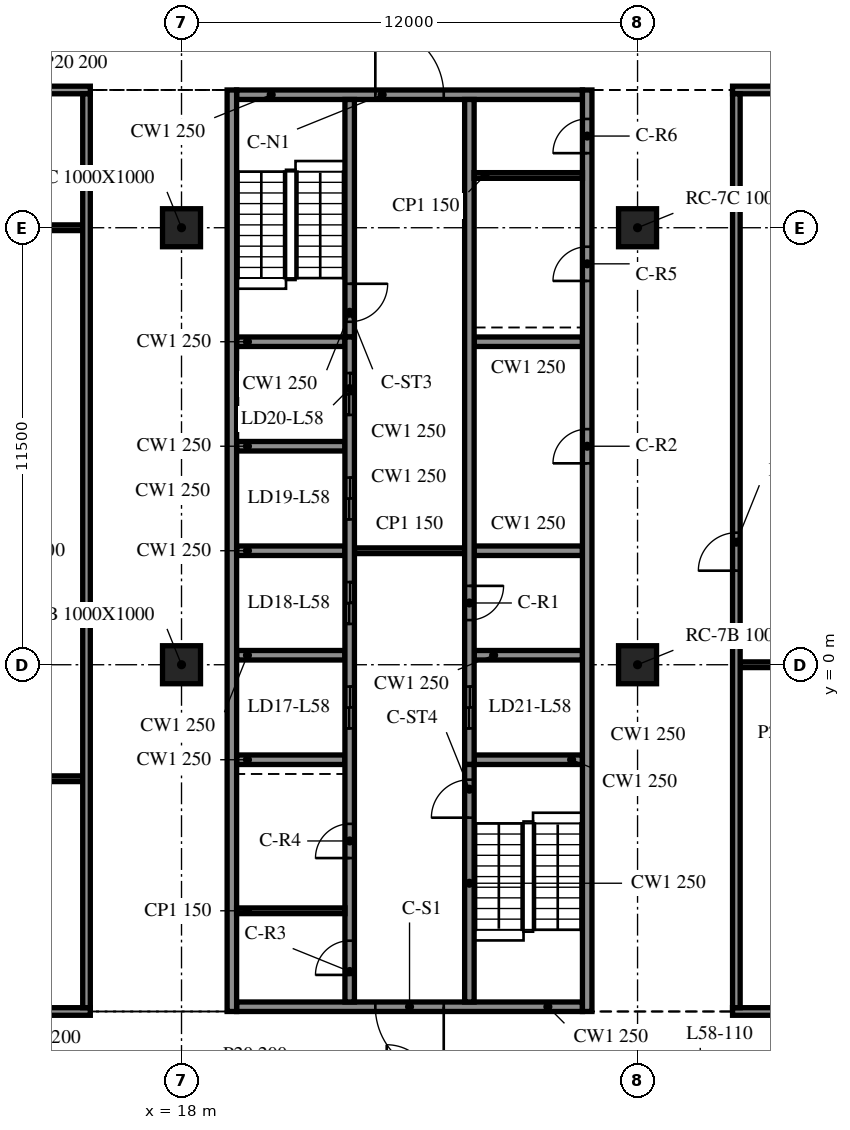
"""IFC4 building model, lengths in metres.
Left out: names, types, materials, properties, quantities, classifications, styles, units other than length and angle.
Written with IfcOpenShell. Run it as: python <this file> out.ifc"""

import sys

from ifc_helpers import new_model, si_unit, direction, frame, frame_2d, origin, origin_2d, place, context, subcontext, project, spatial, rectangle, extrude, element, fill, save


model = new_model("IFC4")
c1 = context("Model", 3, precision=1e-05, world=origin(), true_north=direction((0.0, 1.0)))
c2 = subcontext(c1, "Body", "Model", "MODEL_VIEW")
j1 = project(units=[si_unit("LENGTHUNIT", "METRE"), si_unit("PLANEANGLEUNIT", "RADIAN")], contexts=[c1])
p1 = place(None, origin())
s1 = spatial("IfcSite", under=j1, at=p1, CompositionType="ELEMENT")
p2 = place(p1, origin())
s2 = spatial("IfcBuilding", under=s1, at=p2, CompositionType="ELEMENT")
p3 = place(p2, frame((0.0, 0.0, 240.0)))
s3 = spatial("IfcBuildingStorey", under=s2, at=p3, CompositionType="ELEMENT", Elevation=240.0)
for number, where, z_axis, x_axis in (
    (1, (18.0, 0.0, -0.34), (0.0, 0.0, 1.0), (1.0, 0.0, 0.0)),
    (2, (18.0, 11.5, -0.34), (0.0, 0.0, 1.0), (1.0, 0.0, 0.0)),
    (3, (30.0, 0.0, -0.34), (0.0, 0.0, 1.0), (1.0, 0.0, 0.0)),
    (4, (30.0, 11.5, -0.34), (0.0, 0.0, 1.0), (1.0, 0.0, 0.0)),
):
    element("IfcColumn", number, at=place(p3, frame(where, z_axis=z_axis, x_axis=x_axis)), inside=s3, PredefinedType="COLUMN", context=c2, shape_type="SweptSolid", body=[
        extrude(rectangle(XDim=1.0, YDim=1.0, at=origin_2d()), origin(), (0.0, 0.0, 1.0), 3.8),
    ])
p4 = place(p3, frame((19.325, 15.125, 0.0), z_axis=(0.0, 0.0, 1.0), x_axis=(0.0, -1.0, 0.0)))
e5 = element("IfcWall", 5, at=p4, inside=s3, PredefinedType="SOLIDWALL", context=c2, shape_type="SweptSolid", body=[
    extrude(rectangle(XDim=24.25, YDim=0.25, at=frame_2d((12.125, 0.0))), origin(), (0.0, 0.0, 1.0), 3.46),
])
p5 = place(p3, frame((28.675, -9.125, 0.0), z_axis=(0.0, 0.0, 1.0), x_axis=(0.0, 1.0, 0.0)))
e6 = element("IfcWall", 6, at=p5, inside=s3, PredefinedType="SOLIDWALL", context=c2, shape_type="SweptSolid", body=[
    extrude(rectangle(XDim=24.25, YDim=0.25, at=frame_2d((12.125, 0.0))), origin(), (0.0, 0.0, 1.0), 3.46),
])
p6 = place(p5, frame((14.425, 0.0, 0.0)))
e7 = element("IfcOpeningElement", 7, at=p6, cuts=e6, PredefinedType="OPENING", context=c2, shape_type="SweptSolid", body=[
    extrude(rectangle(XDim=0.9, YDim=2.1, at=frame_2d((0.45, 1.05))), frame((0.0, 0.135, 0.0), z_axis=(0.0, -1.0, 0.0), x_axis=(1.0, 0.0, 0.0)), (0.0, 0.0, 1.0), 0.27),
])
p7 = place(p5, frame((19.225, 0.0, 0.0)))
e8 = element("IfcOpeningElement", 8, at=p7, cuts=e6, PredefinedType="OPENING", context=c2, shape_type="SweptSolid", body=[
    extrude(rectangle(XDim=0.9, YDim=2.1, at=frame_2d((0.45, 1.05))), frame((0.0, 0.135, 0.0), z_axis=(0.0, -1.0, 0.0), x_axis=(1.0, 0.0, 0.0)), (0.0, 0.0, 1.0), 0.27),
])
p8 = place(p5, frame((22.587, 0.0, 0.0)))
e9 = element("IfcOpeningElement", 9, at=p8, cuts=e6, PredefinedType="OPENING", context=c2, shape_type="SweptSolid", body=[
    extrude(rectangle(XDim=0.9, YDim=2.1, at=frame_2d((0.45, 1.05))), frame((0.0, 0.135, 0.0), z_axis=(0.0, -1.0, 0.0), x_axis=(1.0, 0.0, 0.0)), (0.0, 0.0, 1.0), 0.27),
])
p9 = place(p3, frame((28.55, -9.0, 0.0), z_axis=(0.0, 0.0, 1.0), x_axis=(-1.0, 0.0, 0.0)))
e10 = element("IfcWall", 10, at=p9, inside=s3, PredefinedType="SOLIDWALL", context=c2, shape_type="SweptSolid", body=[
    extrude(rectangle(XDim=9.1, YDim=0.25, at=frame_2d((4.55, 0.0))), origin(), (0.0, 0.0, 1.0), 3.46),
])
p10 = place(p9, frame((3.65, 0.0, 0.0)))
e11 = element("IfcOpeningElement", 11, at=p10, cuts=e10, PredefinedType="OPENING", context=c2, shape_type="SweptSolid", body=[
    extrude(rectangle(XDim=1.8, YDim=2.1, at=frame_2d((0.9, 1.05))), frame((0.0, 0.135, 0.0), z_axis=(0.0, -1.0, 0.0), x_axis=(1.0, 0.0, 0.0)), (0.0, 0.0, 1.0), 0.27),
])
p11 = place(p3, frame((19.45, 15.0, 0.0), z_axis=(0.0, 0.0, 1.0), x_axis=(1.0, 0.0, 0.0)))
e12 = element("IfcWall", 12, at=p11, inside=s3, PredefinedType="SOLIDWALL", context=c2, shape_type="SweptSolid", body=[
    extrude(rectangle(XDim=9.1, YDim=0.25, at=frame_2d((4.55, 0.0))), origin(), (0.0, 0.0, 1.0), 3.46),
])
p12 = place(p11, frame((3.65, 0.0, 0.0)))
e13 = element("IfcOpeningElement", 13, at=p12, cuts=e12, PredefinedType="OPENING", context=c2, shape_type="SweptSolid", body=[
    extrude(rectangle(XDim=1.8, YDim=2.1, at=frame_2d((0.9, 1.05))), frame((0.0, 0.135, 0.0), z_axis=(0.0, -1.0, 0.0), x_axis=(1.0, 0.0, 0.0)), (0.0, 0.0, 1.0), 0.27),
])
p13 = place(p3, frame((22.425, -8.875, 0.0), z_axis=(0.0, 0.0, 1.0), x_axis=(0.0, 1.0, 0.0)))
e14 = element("IfcWall", 14, at=p13, inside=s3, PredefinedType="SOLIDWALL", context=c2, shape_type="SweptSolid", body=[
    extrude(rectangle(XDim=17.5, YDim=0.25, at=frame_2d((8.75, 0.0))), origin(), (0.0, 0.0, 1.0), 3.46),
])
p14 = place(p13, frame((7.2, 0.0, 0.0)))
e15 = element("IfcOpeningElement", 15, at=p14, cuts=e14, PredefinedType="OPENING", context=c2, shape_type="SweptSolid", body=[
    extrude(rectangle(XDim=1.1, YDim=2.1, at=frame_2d((0.55, 1.05))), frame((0.0, 0.135, 0.0), z_axis=(0.0, -1.0, 0.0), x_axis=(1.0, 0.0, 0.0)), (0.0, 0.0, 1.0), 0.27),
])
p15 = place(p13, frame((9.95, 0.0, 0.0)))
e16 = element("IfcOpeningElement", 16, at=p15, cuts=e14, PredefinedType="OPENING", context=c2, shape_type="SweptSolid", body=[
    extrude(rectangle(XDim=1.1, YDim=2.1, at=frame_2d((0.55, 1.05))), frame((0.0, 0.135, 0.0), z_axis=(0.0, -1.0, 0.0), x_axis=(1.0, 0.0, 0.0)), (0.0, 0.0, 1.0), 0.27),
])
p16 = place(p13, frame((12.7, 0.0, 0.0)))
e17 = element("IfcOpeningElement", 17, at=p16, cuts=e14, PredefinedType="OPENING", context=c2, shape_type="SweptSolid", body=[
    extrude(rectangle(XDim=1.1, YDim=2.1, at=frame_2d((0.55, 1.05))), frame((0.0, 0.135, 0.0), z_axis=(0.0, -1.0, 0.0), x_axis=(1.0, 0.0, 0.0)), (0.0, 0.0, 1.0), 0.27),
])
p17 = place(p13, frame((15.45, 0.0, 0.0)))
e18 = element("IfcOpeningElement", 18, at=p17, cuts=e14, PredefinedType="OPENING", context=c2, shape_type="SweptSolid", body=[
    extrude(rectangle(XDim=1.1, YDim=2.1, at=frame_2d((0.55, 1.05))), frame((0.0, 0.135, 0.0), z_axis=(0.0, -1.0, 0.0), x_axis=(1.0, 0.0, 0.0)), (0.0, 0.0, 1.0), 0.27),
])
p18 = place(p13, frame((0.712, 0.0, 0.0)))
e19 = element("IfcOpeningElement", 19, at=p18, cuts=e14, PredefinedType="OPENING", context=c2, shape_type="SweptSolid", body=[
    extrude(rectangle(XDim=0.9, YDim=2.1, at=frame_2d((0.45, 1.05))), frame((0.0, 0.135, 0.0), z_axis=(0.0, -1.0, 0.0), x_axis=(1.0, 0.0, 0.0)), (0.0, 0.0, 1.0), 0.27),
])
p19 = place(p13, frame((3.788, 0.0, 0.0)))
e20 = element("IfcOpeningElement", 20, at=p19, cuts=e14, PredefinedType="OPENING", context=c2, shape_type="SweptSolid", body=[
    extrude(rectangle(XDim=0.9, YDim=2.1, at=frame_2d((0.45, 1.05))), frame((0.0, 0.135, 0.0), z_axis=(0.0, -1.0, 0.0), x_axis=(1.0, 0.0, 0.0)), (0.0, 0.0, 1.0), 0.27),
])
p20 = place(p3, frame((22.425, 14.875, 0.0), z_axis=(0.0, 0.0, 1.0), x_axis=(0.0, -1.0, 0.0)))
e21 = element("IfcWall", 21, at=p20, inside=s3, PredefinedType="SOLIDWALL", context=c2, shape_type="SweptSolid", body=[
    extrude(rectangle(XDim=6.25, YDim=0.25, at=frame_2d((3.125, 0.0))), origin(), (0.0, 0.0, 1.0), 3.46),
])
p21 = place(p20, frame((4.85, 0.0, 0.0)))
e22 = element("IfcOpeningElement", 22, at=p21, cuts=e21, PredefinedType="OPENING", context=c2, shape_type="SweptSolid", body=[
    extrude(rectangle(XDim=1.0, YDim=2.1, at=frame_2d((0.5, 1.05))), frame((0.0, 0.135, 0.0), z_axis=(0.0, -1.0, 0.0), x_axis=(1.0, 0.0, 0.0)), (0.0, 0.0, 1.0), 0.27),
])
p22 = place(p3, frame((25.575, -8.875, 0.0), z_axis=(0.0, 0.0, 1.0), x_axis=(0.0, 1.0, 0.0)))
e23 = element("IfcWall", 23, at=p22, inside=s3, PredefinedType="SOLIDWALL", context=c2, shape_type="SweptSolid", body=[
    extrude(rectangle(XDim=6.25, YDim=0.25, at=frame_2d((3.125, 0.0))), origin(), (0.0, 0.0, 1.0), 3.46),
])
p23 = place(p22, frame((4.85, 0.0, 0.0)))
e24 = element("IfcOpeningElement", 24, at=p23, cuts=e23, PredefinedType="OPENING", context=c2, shape_type="SweptSolid", body=[
    extrude(rectangle(XDim=1.0, YDim=2.1, at=frame_2d((0.5, 1.05))), frame((0.0, 0.135, 0.0), z_axis=(0.0, -1.0, 0.0), x_axis=(1.0, 0.0, 0.0)), (0.0, 0.0, 1.0), 0.27),
])
p24 = place(p3, frame((25.575, 14.875, 0.0), z_axis=(0.0, 0.0, 1.0), x_axis=(0.0, -1.0, 0.0)))
e25 = element("IfcWall", 25, at=p24, inside=s3, PredefinedType="SOLIDWALL", context=c2, shape_type="SweptSolid", body=[
    extrude(rectangle(XDim=17.5, YDim=0.25, at=frame_2d((8.75, 0.0))), origin(), (0.0, 0.0, 1.0), 3.46),
])
p25 = place(p24, frame((15.45, 0.0, 0.0)))
e26 = element("IfcOpeningElement", 26, at=p25, cuts=e25, PredefinedType="OPENING", context=c2, shape_type="SweptSolid", body=[
    extrude(rectangle(XDim=1.1, YDim=2.1, at=frame_2d((0.55, 1.05))), frame((0.0, 0.135, 0.0), z_axis=(0.0, -1.0, 0.0), x_axis=(1.0, 0.0, 0.0)), (0.0, 0.0, 1.0), 0.27),
])
p26 = place(p24, frame((12.8, 0.0, 0.0)))
e27 = element("IfcOpeningElement", 27, at=p26, cuts=e25, PredefinedType="OPENING", context=c2, shape_type="SweptSolid", body=[
    extrude(rectangle(XDim=0.9, YDim=2.1, at=frame_2d((0.45, 1.05))), frame((0.0, 0.135, 0.0), z_axis=(0.0, -1.0, 0.0), x_axis=(1.0, 0.0, 0.0)), (0.0, 0.0, 1.0), 0.27),
])
for number, where, z_axis, x_axis in (
    (28, (19.45, -2.5, 0.0), (0.0, 0.0, 1.0), (1.0, 0.0, 0.0)),
    (29, (19.45, 0.25, 0.0), (0.0, 0.0, 1.0), (1.0, 0.0, 0.0)),
    (30, (19.45, 3.0, 0.0), (0.0, 0.0, 1.0), (1.0, 0.0, 0.0)),
    (31, (19.45, 5.75, 0.0), (0.0, 0.0, 1.0), (1.0, 0.0, 0.0)),
    (32, (19.45, 8.5, 0.0), (0.0, 0.0, 1.0), (1.0, 0.0, 0.0)),
    (33, (25.7, -2.5, 0.0), (0.0, 0.0, 1.0), (1.0, 0.0, 0.0)),
    (34, (25.7, 0.25, 0.0), (0.0, 0.0, 1.0), (1.0, 0.0, 0.0)),
    (35, (25.7, 3.0, 0.0), (0.0, 0.0, 1.0), (1.0, 0.0, 0.0)),
    (36, (25.7, 8.5, 0.0), (0.0, 0.0, 1.0), (1.0, 0.0, 0.0)),
):
    element("IfcWall", number, at=place(p3, frame(where, z_axis=z_axis, x_axis=x_axis)), inside=s3, PredefinedType="SOLIDWALL", context=c2, shape_type="SweptSolid", body=[
        extrude(rectangle(XDim=2.85, YDim=0.25, at=frame_2d((1.425, 0.0))), origin(), (0.0, 0.0, 1.0), 3.46),
    ])
p27 = place(p3, frame((22.55, 3.0, 0.0), z_axis=(0.0, 0.0, 1.0), x_axis=(1.0, 0.0, 0.0)))
e37 = element("IfcWall", 37, at=p27, inside=s3, PredefinedType="PARTITIONING", context=c2, shape_type="SweptSolid", body=[
    extrude(rectangle(XDim=2.9, YDim=0.15, at=frame_2d((1.45, 0.0))), origin(), (0.0, 0.0, 1.0), 3.46),
])
for number, where, z_axis, x_axis in (
    (38, (19.45, -6.475, 0.0), (0.0, 0.0, 1.0), (1.0, 0.0, 0.0)),
    (39, (25.7, 12.875, 0.0), (0.0, 0.0, 1.0), (1.0, 0.0, 0.0)),
):
    element("IfcWall", number, at=place(p3, frame(where, z_axis=z_axis, x_axis=x_axis)), inside=s3, PredefinedType="PARTITIONING", context=c2, shape_type="SweptSolid", body=[
        extrude(rectangle(XDim=2.85, YDim=0.15, at=frame_2d((1.425, 0.0))), origin(), (0.0, 0.0, 1.0), 3.46),
    ])
p28 = place(p3, frame((8.3, -9.125, 0.0), z_axis=(0.0, 0.0, 1.0), x_axis=(1.0, 0.0, 0.0)))
e40 = element("IfcWall", 40, at=p28, inside=s3, PredefinedType="PARTITIONING", context=c2, shape_type="SweptSolid", body=[
    extrude(rectangle(XDim=7.3, YDim=0.2, at=frame_2d((3.65, 0.0))), origin(), (0.0, 0.0, 1.0), 3.46),
])
p29 = place(p28, frame((3.1, 0.0, 0.0)))
e41 = element("IfcOpeningElement", 41, at=p29, cuts=e40, PredefinedType="OPENING", context=c2, shape_type="SweptSolid", body=[
    extrude(rectangle(XDim=0.9, YDim=2.1, at=frame_2d((0.45, 1.05))), frame((0.0, 0.11, 0.0), z_axis=(0.0, -1.0, 0.0), x_axis=(1.0, 0.0, 0.0)), (0.0, 0.0, 1.0), 0.22),
])
p30 = place(p3, frame((32.5, -9.125, 0.0), z_axis=(0.0, 0.0, 1.0), x_axis=(1.0, 0.0, 0.0)))
e42 = element("IfcWall", 42, at=p30, inside=s3, PredefinedType="PARTITIONING", context=c2, shape_type="SweptSolid", body=[
    extrude(rectangle(XDim=21.475, YDim=0.2, at=frame_2d((10.738, 0.0))), origin(), (0.0, 0.0, 1.0), 3.46),
])
p31 = place(p30, frame((10.1, 0.0, 0.0)))
e43 = element("IfcOpeningElement", 43, at=p31, cuts=e42, PredefinedType="OPENING", context=c2, shape_type="SweptSolid", body=[
    extrude(rectangle(XDim=1.0, YDim=2.1, at=frame_2d((0.5, 1.05))), frame((0.0, 0.11, 0.0), z_axis=(0.0, -1.0, 0.0), x_axis=(1.0, 0.0, 0.0)), (0.0, 0.0, 1.0), 0.22),
])
p32 = place(p3, frame((8.5, -3.0, 0.0), z_axis=(0.0, 0.0, 1.0), x_axis=(1.0, 0.0, 0.0)))
e44 = element("IfcWall", 44, at=p32, inside=s3, PredefinedType="PARTITIONING", context=c2, shape_type="SweptSolid", body=[
    extrude(rectangle(XDim=6.9, YDim=0.15, at=frame_2d((3.45, 0.0))), origin(), (0.0, 0.0, 1.0), 3.46),
])
p33 = place(p3, frame((32.7, 0.0, 0.0), z_axis=(0.0, 0.0, 1.0), x_axis=(1.0, 0.0, 0.0)))
e45 = element("IfcWall", 45, at=p33, inside=s3, PredefinedType="PARTITIONING", context=c2, shape_type="SweptSolid", body=[
    extrude(rectangle(XDim=8.8, YDim=0.15, at=frame_2d((4.4, 0.0))), origin(), (0.0, 0.0, 1.0), 3.46),
])
p34 = place(p3, frame((8.5, 11.5, 0.0), z_axis=(0.0, 0.0, 1.0), x_axis=(1.0, 0.0, 0.0)))
e46 = element("IfcWall", 46, at=p34, inside=s3, PredefinedType="PARTITIONING", context=c2, shape_type="SweptSolid", body=[
    extrude(rectangle(XDim=6.9, YDim=0.15, at=frame_2d((3.45, 0.0))), origin(), (0.0, 0.0, 1.0), 3.46),
])
p35 = place(p3, frame((8.3, 15.125, 0.0), z_axis=(0.0, 0.0, 1.0), x_axis=(1.0, 0.0, 0.0)))
e47 = element("IfcWall", 47, at=p35, inside=s3, PredefinedType="PARTITIONING", context=c2, shape_type="SweptSolid", body=[
    extrude(rectangle(XDim=7.3, YDim=0.2, at=frame_2d((3.65, 0.0))), origin(), (0.0, 0.0, 1.0), 3.46),
])
p36 = place(p35, frame((3.1, 0.0, 0.0)))
e48 = element("IfcOpeningElement", 48, at=p36, cuts=e47, PredefinedType="OPENING", context=c2, shape_type="SweptSolid", body=[
    extrude(rectangle(XDim=0.9, YDim=2.1, at=frame_2d((0.45, 1.05))), frame((0.0, 0.11, 0.0), z_axis=(0.0, -1.0, 0.0), x_axis=(1.0, 0.0, 0.0)), (0.0, 0.0, 1.0), 0.22),
])
p37 = place(p3, frame((32.5, 15.125, 0.0), z_axis=(0.0, 0.0, 1.0), x_axis=(1.0, 0.0, 0.0)))
e49 = element("IfcWall", 49, at=p37, inside=s3, PredefinedType="PARTITIONING", context=c2, shape_type="SweptSolid", body=[
    extrude(rectangle(XDim=21.475, YDim=0.2, at=frame_2d((10.738, 0.0))), origin(), (0.0, 0.0, 1.0), 3.46),
])
p38 = place(p3, frame((15.5, -9.025, 0.0), z_axis=(0.0, 0.0, 1.0), x_axis=(0.0, 1.0, 0.0)))
e50 = element("IfcWall", 50, at=p38, inside=s3, PredefinedType="PARTITIONING", context=c2, shape_type="SweptSolid", body=[
    extrude(rectangle(XDim=24.05, YDim=0.2, at=frame_2d((12.025, 0.0))), origin(), (0.0, 0.0, 1.0), 3.46),
])
p39 = place(p3, frame((32.6, -9.025, 0.0), z_axis=(0.0, 0.0, 1.0), x_axis=(0.0, 1.0, 0.0)))
e51 = element("IfcWall", 51, at=p39, inside=s3, PredefinedType="PARTITIONING", context=c2, shape_type="SweptSolid", body=[
    extrude(rectangle(XDim=24.05, YDim=0.2, at=frame_2d((12.025, 0.0))), origin(), (0.0, 0.0, 1.0), 3.46),
])
p40 = place(p39, frame((11.5, 0.0, 0.0)))
e52 = element("IfcOpeningElement", 52, at=p40, cuts=e51, PredefinedType="OPENING", context=c2, shape_type="SweptSolid", body=[
    extrude(rectangle(XDim=1.0, YDim=2.1, at=frame_2d((0.5, 1.05))), frame((0.0, 0.11, 0.0), z_axis=(0.0, -1.0, 0.0), x_axis=(1.0, 0.0, 0.0)), (0.0, 0.0, 1.0), 0.22),
])
p41 = place(p10, origin())
e53 = element("IfcDoor", 53, at=p41, inside=s3, OperationType="DOUBLE_DOOR_SINGLE_SWING", PredefinedType="DOOR", context=c2, shape_type="SweptSolid", body=[
    extrude(rectangle(XDim=1.8, YDim=2.1, at=frame_2d((0.9, 1.05))), frame((0.0, 0.025, 0.0), z_axis=(0.0, -1.0, 0.0), x_axis=(1.0, 0.0, 0.0)), (0.0, 0.0, 1.0), 0.05),
])
fill(e11, e53)
p42 = place(p12, origin())
e54 = element("IfcDoor", 54, at=p42, inside=s3, OperationType="DOUBLE_DOOR_SINGLE_SWING", PredefinedType="DOOR", context=c2, shape_type="SweptSolid", body=[
    extrude(rectangle(XDim=1.8, YDim=2.1, at=frame_2d((0.9, 1.05))), frame((0.0, 0.025, 0.0), z_axis=(0.0, -1.0, 0.0), x_axis=(1.0, 0.0, 0.0)), (0.0, 0.0, 1.0), 0.05),
])
fill(e13, e54)
p43 = place(p25, origin())
e55 = element("IfcDoor", 55, at=p43, inside=s3, OperationType="DOUBLE_DOOR_SLIDING", PredefinedType="DOOR", context=c2, shape_type="SweptSolid", body=[
    extrude(rectangle(XDim=1.1, YDim=2.1, at=frame_2d((0.55, 1.05))), frame((0.0, 0.025, 0.0), z_axis=(0.0, -1.0, 0.0), x_axis=(1.0, 0.0, 0.0)), (0.0, 0.0, 1.0), 0.05),
])
fill(e26, e55)
p44 = place(p14, origin())
e56 = element("IfcDoor", 56, at=p44, inside=s3, OperationType="DOUBLE_DOOR_SLIDING", PredefinedType="DOOR", context=c2, shape_type="SweptSolid", body=[
    extrude(rectangle(XDim=1.1, YDim=2.1, at=frame_2d((0.55, 1.05))), frame((0.0, 0.025, 0.0), z_axis=(0.0, -1.0, 0.0), x_axis=(1.0, 0.0, 0.0)), (0.0, 0.0, 1.0), 0.05),
])
fill(e15, e56)
p45 = place(p15, origin())
e57 = element("IfcDoor", 57, at=p45, inside=s3, OperationType="DOUBLE_DOOR_SLIDING", PredefinedType="DOOR", context=c2, shape_type="SweptSolid", body=[
    extrude(rectangle(XDim=1.1, YDim=2.1, at=frame_2d((0.55, 1.05))), frame((0.0, 0.025, 0.0), z_axis=(0.0, -1.0, 0.0), x_axis=(1.0, 0.0, 0.0)), (0.0, 0.0, 1.0), 0.05),
])
fill(e16, e57)
p46 = place(p16, origin())
e58 = element("IfcDoor", 58, at=p46, inside=s3, OperationType="DOUBLE_DOOR_SLIDING", PredefinedType="DOOR", context=c2, shape_type="SweptSolid", body=[
    extrude(rectangle(XDim=1.1, YDim=2.1, at=frame_2d((0.55, 1.05))), frame((0.0, 0.025, 0.0), z_axis=(0.0, -1.0, 0.0), x_axis=(1.0, 0.0, 0.0)), (0.0, 0.0, 1.0), 0.05),
])
fill(e17, e58)
p47 = place(p17, origin())
e59 = element("IfcDoor", 59, at=p47, inside=s3, OperationType="DOUBLE_DOOR_SLIDING", PredefinedType="DOOR", context=c2, shape_type="SweptSolid", body=[
    extrude(rectangle(XDim=1.1, YDim=2.1, at=frame_2d((0.55, 1.05))), frame((0.0, 0.025, 0.0), z_axis=(0.0, -1.0, 0.0), x_axis=(1.0, 0.0, 0.0)), (0.0, 0.0, 1.0), 0.05),
])
fill(e18, e59)
p48 = place(p26, origin())
e60 = element("IfcDoor", 60, at=p48, inside=s3, OperationType="SINGLE_SWING_LEFT", PredefinedType="DOOR", context=c2, shape_type="SweptSolid", body=[
    extrude(rectangle(XDim=0.9, YDim=2.1, at=frame_2d((0.45, 1.05))), frame((0.0, 0.025, 0.0), z_axis=(0.0, -1.0, 0.0), x_axis=(1.0, 0.0, 0.0)), (0.0, 0.0, 1.0), 0.05),
])
fill(e27, e60)
p49 = place(p6, origin())
e61 = element("IfcDoor", 61, at=p49, inside=s3, OperationType="SINGLE_SWING_RIGHT", PredefinedType="DOOR", context=c2, shape_type="SweptSolid", body=[
    extrude(rectangle(XDim=0.9, YDim=2.1, at=frame_2d((0.45, 1.05))), frame((0.0, 0.025, 0.0), z_axis=(0.0, -1.0, 0.0), x_axis=(1.0, 0.0, 0.0)), (0.0, 0.0, 1.0), 0.05),
])
fill(e7, e61)
p50 = place(p18, origin())
e62 = element("IfcDoor", 62, at=p50, inside=s3, OperationType="SINGLE_SWING_LEFT", PredefinedType="DOOR", context=c2, shape_type="SweptSolid", body=[
    extrude(rectangle(XDim=0.9, YDim=2.1, at=frame_2d((0.45, 1.05))), frame((0.0, 0.025, 0.0), z_axis=(0.0, -1.0, 0.0), x_axis=(1.0, 0.0, 0.0)), (0.0, 0.0, 1.0), 0.05),
])
fill(e19, e62)
p51 = place(p19, origin())
e63 = element("IfcDoor", 63, at=p51, inside=s3, OperationType="SINGLE_SWING_RIGHT", PredefinedType="DOOR", context=c2, shape_type="SweptSolid", body=[
    extrude(rectangle(XDim=0.9, YDim=2.1, at=frame_2d((0.45, 1.05))), frame((0.0, 0.025, 0.0), z_axis=(0.0, -1.0, 0.0), x_axis=(1.0, 0.0, 0.0)), (0.0, 0.0, 1.0), 0.05),
])
fill(e20, e63)
p52 = place(p7, origin())
e64 = element("IfcDoor", 64, at=p52, inside=s3, OperationType="SINGLE_SWING_LEFT", PredefinedType="DOOR", context=c2, shape_type="SweptSolid", body=[
    extrude(rectangle(XDim=0.9, YDim=2.1, at=frame_2d((0.45, 1.05))), frame((0.0, 0.025, 0.0), z_axis=(0.0, -1.0, 0.0), x_axis=(1.0, 0.0, 0.0)), (0.0, 0.0, 1.0), 0.05),
])
fill(e8, e64)
p53 = place(p8, origin())
e65 = element("IfcDoor", 65, at=p53, inside=s3, OperationType="SINGLE_SWING_RIGHT", PredefinedType="DOOR", context=c2, shape_type="SweptSolid", body=[
    extrude(rectangle(XDim=0.9, YDim=2.1, at=frame_2d((0.45, 1.05))), frame((0.0, 0.025, 0.0), z_axis=(0.0, -1.0, 0.0), x_axis=(1.0, 0.0, 0.0)), (0.0, 0.0, 1.0), 0.05),
])
fill(e9, e65)
p54 = place(p21, origin())
e66 = element("IfcDoor", 66, at=p54, inside=s3, OperationType="SINGLE_SWING_LEFT", PredefinedType="DOOR", context=c2, shape_type="SweptSolid", body=[
    extrude(rectangle(XDim=1.0, YDim=2.1, at=frame_2d((0.5, 1.05))), frame((0.0, 0.025, 0.0), z_axis=(0.0, -1.0, 0.0), x_axis=(1.0, 0.0, 0.0)), (0.0, 0.0, 1.0), 0.05),
])
fill(e22, e66)
p55 = place(p23, origin())
e67 = element("IfcDoor", 67, at=p55, inside=s3, OperationType="SINGLE_SWING_RIGHT", PredefinedType="DOOR", context=c2, shape_type="SweptSolid", body=[
    extrude(rectangle(XDim=1.0, YDim=2.1, at=frame_2d((0.5, 1.05))), frame((0.0, 0.025, 0.0), z_axis=(0.0, -1.0, 0.0), x_axis=(1.0, 0.0, 0.0)), (0.0, 0.0, 1.0), 0.05),
])
fill(e24, e67)
p56 = place(p40, origin())
e68 = element("IfcDoor", 68, at=p56, inside=s3, OperationType="SINGLE_SWING_RIGHT", PredefinedType="DOOR", context=c2, shape_type="SweptSolid", body=[
    extrude(rectangle(XDim=1.0, YDim=2.1, at=frame_2d((0.5, 1.05))), frame((0.0, 0.025, 0.0), z_axis=(0.0, -1.0, 0.0), x_axis=(1.0, 0.0, 0.0)), (0.0, 0.0, 1.0), 0.05),
])
fill(e52, e68)
save(model, sys.argv[1])
